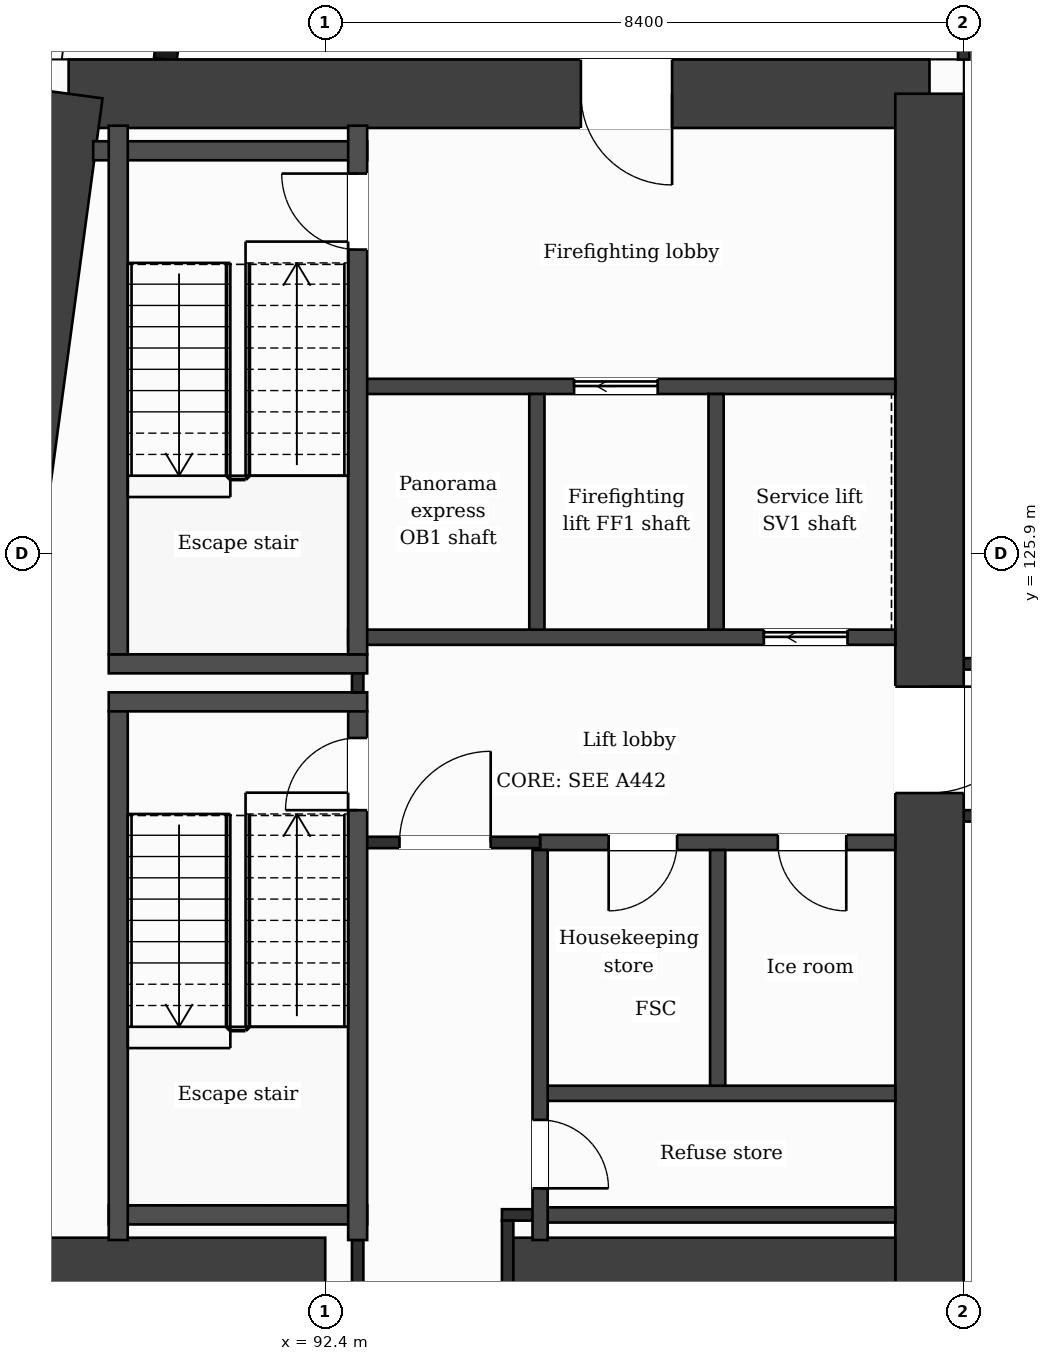
"""IFC4 building model, lengths in metres.
Left out: names, types, materials, properties, quantities, classifications, styles, units other than length and angle.
Written with IfcOpenShell. Run it as: python <this file> out.ifc"""

import sys

from ifc_helpers import new_model, si_unit, direction, frame, frame_2d, origin, place, context, subcontext, project, spatial, rectangle, extrude, element, fill, save


model = new_model("IFC4")
c1 = context("Model", 3, precision=1e-05, world=origin(), true_north=direction((0.0, 1.0)))
c2 = subcontext(c1, "Body", "Model", "MODEL_VIEW")
j1 = project(units=[si_unit("LENGTHUNIT", "METRE"), si_unit("PLANEANGLEUNIT", "RADIAN")], contexts=[c1])
p1 = place(None, origin())
s1 = spatial("IfcSite", under=j1, at=p1, CompositionType="ELEMENT")
p2 = place(p1, origin())
s2 = spatial("IfcBuilding", under=s1, at=p2, CompositionType="ELEMENT")
p3 = place(p2, frame((0.0, 0.0, 173.7)))
s3 = spatial("IfcBuildingStorey", under=s2, at=p3, CompositionType="ELEMENT", Elevation=173.7)
p4 = place(p3, frame((89.024, 131.95, 0.0), z_axis=(0.0, 0.0, 1.0), x_axis=(1.0, 0.0, 0.0)))
e1 = element("IfcWall", 1, at=p4, inside=s3, PredefinedType="SHEAR", context=c2, shape_type="SweptSolid", body=[
    extrude(rectangle(XDim=11.326, YDim=0.9, at=frame_2d((5.663, 0.0))), origin(), (0.0, 0.0, 1.0), 3.7),
])
p5 = place(p4, frame((6.739, 0.0, 0.0)))
e2 = element("IfcOpeningElement", 2, at=p5, cuts=e1, PredefinedType="OPENING", context=c2, shape_type="SweptSolid", body=[
    extrude(rectangle(XDim=1.2, YDim=2.1, at=frame_2d((0.6, 1.05))), frame((0.0, 0.46, 0.0), z_axis=(0.0, -1.0, 0.0), x_axis=(1.0, 0.0, 0.0)), (0.0, 0.0, 1.0), 0.92),
])
p6 = place(p3, frame((100.35, 131.95, 0.0), z_axis=(0.0, 0.0, 1.0), x_axis=(0.0, -1.0, 0.0)))
e3 = element("IfcWall", 3, at=p6, inside=s3, PredefinedType="SHEAR", context=c2, shape_type="SweptSolid", body=[
    extrude(rectangle(XDim=21.1, YDim=0.9, at=frame_2d((10.55, 0.0))), origin(), (0.0, 0.0, 1.0), 3.7),
])
p7 = place(p6, frame((7.8, 0.0, 0.0)))
e4 = element("IfcOpeningElement", 4, at=p7, cuts=e3, PredefinedType="OPENING", context=c2, shape_type="SweptSolid", body=[
    extrude(rectangle(XDim=1.4, YDim=2.1, at=frame_2d((0.7, 1.05))), frame((0.0, 0.46, 0.0), z_axis=(0.0, -1.0, 0.0), x_axis=(1.0, 0.0, 0.0)), (0.0, 0.0, 1.0), 0.92),
])
p8 = place(p3, frame((86.184, 110.85, 0.0), z_axis=(0.0, 0.0, 1.0), x_axis=(0.133410495943, 0.991060865725, 0.0)))
e5 = element("IfcWall", 5, at=p8, inside=s3, PredefinedType="SHEAR", context=c2, shape_type="SweptSolid", body=[
    extrude(rectangle(XDim=21.29, YDim=0.9, at=frame_2d((10.645, 0.0))), origin(), (0.0, 0.0, 1.0), 3.7),
])
p9 = place(p3, frame((87.323, 116.45, 0.0), z_axis=(0.0, 0.0, 1.0), x_axis=(1.0, 0.0, 0.0)))
e6 = element("IfcWall", 6, at=p9, inside=s3, PredefinedType="SHEAR", context=c2, shape_type="SweptSolid", body=[
    extrude(rectangle(XDim=5.077, YDim=0.9, at=frame_2d((2.539, 0.0))), origin(), (0.0, 0.0, 1.0), 3.7),
])
p10 = place(p3, frame((94.8, 116.45, 0.0), z_axis=(0.0, 0.0, 1.0), x_axis=(1.0, 0.0, 0.0)))
e7 = element("IfcWall", 7, at=p10, inside=s3, PredefinedType="SHEAR", context=c2, shape_type="SweptSolid", body=[
    extrude(rectangle(XDim=5.1, YDim=0.9, at=frame_2d((2.55, 0.0))), origin(), (0.0, 0.0, 1.0), 3.7),
])
p11 = place(p3, frame((91.177, 138.95, 0.0), z_axis=(0.0, 0.0, 1.0), x_axis=(-0.133426664613, -0.991058689065, 0.0)))
e8 = element("IfcWall", 8, at=p11, inside=s3, PredefinedType="SOLIDWALL", context=c2, shape_type="SweptSolid", body=[
    extrude(rectangle(XDim=6.609, YDim=0.3, at=frame_2d((3.305, 0.0))), origin(), (0.0, 0.0, 1.0), 3.38),
])
p12 = place(p11, frame((1.039, 0.0, 0.9)))
e9 = element("IfcOpeningElement", 9, at=p12, cuts=e8, PredefinedType="OPENING", context=c2, shape_type="SweptSolid", body=[
    extrude(rectangle(XDim=1.2, YDim=2.1, at=frame_2d((0.6, 1.05))), frame((0.0, 0.16, 0.0), z_axis=(0.0, -1.0, 0.0), x_axis=(1.0, 0.0, 0.0)), (0.0, 0.0, 1.0), 0.32),
])
p13 = place(p11, frame((4.294, 0.0, 0.0)))
e10 = element("IfcOpeningElement", 10, at=p13, cuts=e8, PredefinedType="OPENING", context=c2, shape_type="SweptSolid", body=[
    extrude(rectangle(XDim=1.2, YDim=2.4, at=frame_2d((0.6, 1.2))), frame((0.0, 0.16, 0.0), z_axis=(0.0, -1.0, 0.0), x_axis=(1.0, 0.0, 0.0)), (0.0, 0.0, 1.0), 0.32),
])
p14 = place(p3, frame((95.227, 117.2, 0.0), z_axis=(0.0, 0.0, 1.0), x_axis=(1.0, 0.0, 0.0)))
e11 = element("IfcWall", 11, at=p14, inside=s3, PredefinedType="PARTITIONING", context=c2, shape_type="SweptSolid", body=[
    extrude(rectangle(XDim=4.673, YDim=0.2, at=frame_2d((2.336, 0.0))), origin(), (0.0, 0.0, 1.0), 3.38),
])
p15 = place(p3, frame((94.725, 117.2, 0.0), z_axis=(0.0, 0.0, 1.0), x_axis=(1.0, 0.0, 0.0)))
e12 = element("IfcWall", 12, at=p15, inside=s3, PredefinedType="PARTITIONING", context=c2, shape_type="SweptSolid", body=[
    extrude(rectangle(XDim=0.502, YDim=0.15, at=frame_2d((0.251, 0.0))), origin(), (0.0, 0.0, 1.0), 3.38),
])
p16 = place(p3, frame((89.552, 117.2, 0.0), z_axis=(0.0, 0.0, 1.0), x_axis=(1.0, 0.0, 0.0)))
e13 = element("IfcWall", 13, at=p16, inside=s3, PredefinedType="PARTITIONING", context=c2, shape_type="SweptSolid", body=[
    extrude(rectangle(XDim=3.4, YDim=0.25, at=frame_2d((1.7, 0.0))), origin(), (0.0, 0.0, 1.0), 3.38),
])
p17 = place(p3, frame((95.227, 118.8, 0.0), z_axis=(0.0, 0.0, 1.0), x_axis=(1.0, 0.0, 0.0)))
e14 = element("IfcWall", 14, at=p17, inside=s3, PredefinedType="PARTITIONING", context=c2, shape_type="SweptSolid", body=[
    extrude(rectangle(XDim=4.673, YDim=0.2, at=frame_2d((2.336, 0.0))), origin(), (0.0, 0.0, 1.0), 3.38),
])
p18 = place(p3, frame((95.227, 122.1, 0.0), z_axis=(0.0, 0.0, 1.0), x_axis=(1.0, 0.0, 0.0)))
e15 = element("IfcWall", 15, at=p18, inside=s3, PredefinedType="PARTITIONING", context=c2, shape_type="SweptSolid", body=[
    extrude(rectangle(XDim=4.673, YDim=0.2, at=frame_2d((2.336, 0.0))), origin(), (0.0, 0.0, 1.0), 3.38),
])
p19 = place(p18, frame((0.902, 0.0, 0.0)))
e16 = element("IfcOpeningElement", 16, at=p19, cuts=e15, PredefinedType="OPENING", context=c2, shape_type="SweptSolid", body=[
    extrude(rectangle(XDim=0.9, YDim=2.1, at=frame_2d((0.45, 1.05))), frame((0.0, 0.11, 0.0), z_axis=(0.0, -1.0, 0.0), x_axis=(1.0, 0.0, 0.0)), (0.0, 0.0, 1.0), 0.22),
])
p20 = place(p18, frame((3.128, 0.0, 0.0)))
e17 = element("IfcOpeningElement", 17, at=p20, cuts=e15, PredefinedType="OPENING", context=c2, shape_type="SweptSolid", body=[
    extrude(rectangle(XDim=0.9, YDim=2.1, at=frame_2d((0.45, 1.05))), frame((0.0, 0.11, 0.0), z_axis=(0.0, -1.0, 0.0), x_axis=(1.0, 0.0, 0.0)), (0.0, 0.0, 1.0), 0.22),
])
p21 = place(p3, frame((92.827, 122.1, 0.0), z_axis=(0.0, 0.0, 1.0), x_axis=(1.0, 0.0, 0.0)))
e18 = element("IfcWall", 18, at=p21, inside=s3, PredefinedType="PARTITIONING", context=c2, shape_type="SweptSolid", body=[
    extrude(rectangle(XDim=2.4, YDim=0.15, at=frame_2d((1.2, 0.0))), origin(), (0.0, 0.0, 1.0), 3.38),
])
p22 = place(p21, frame((0.55, 0.0, 0.0)))
e19 = element("IfcOpeningElement", 19, at=p22, cuts=e18, PredefinedType="OPENING", context=c2, shape_type="SweptSolid", body=[
    extrude(rectangle(XDim=1.2, YDim=2.1, at=frame_2d((0.6, 1.05))), frame((0.0, 0.085, 0.0), z_axis=(0.0, -1.0, 0.0), x_axis=(1.0, 0.0, 0.0)), (0.0, 0.0, 1.0), 0.17),
])
p23 = place(p3, frame((100.8, 122.45, 0.0), z_axis=(0.0, 0.0, 1.0), x_axis=(1.0, 0.0, 0.0)))
e20 = element("IfcWall", 20, at=p23, inside=s3, PredefinedType="PARTITIONING", context=c2, shape_type="SweptSolid", body=[
    extrude(rectangle(XDim=25.2, YDim=0.15, at=frame_2d((12.6, 0.0))), origin(), (0.0, 0.0, 1.0), 3.38),
])
for number, where, z_axis, x_axis in (
    (21, (89.552, 123.95, 0.0), (0.0, 0.0, 1.0), (1.0, 0.0, 0.0)),
    (22, (89.552, 124.45, 0.0), (0.0, 0.0, 1.0), (1.0, 0.0, 0.0)),
):
    element("IfcWall", number, at=place(p3, frame(where, z_axis=z_axis, x_axis=x_axis)), inside=s3, PredefinedType="PARTITIONING", context=c2, shape_type="SweptSolid", body=[
        extrude(rectangle(XDim=3.4, YDim=0.25, at=frame_2d((1.7, 0.0))), origin(), (0.0, 0.0, 1.0), 3.38),
    ])
p24 = place(p3, frame((100.8, 124.45, 0.0), z_axis=(0.0, 0.0, 1.0), x_axis=(1.0, 0.0, 0.0)))
e23 = element("IfcWall", 23, at=p24, inside=s3, PredefinedType="PARTITIONING", context=c2, shape_type="SweptSolid", body=[
    extrude(rectangle(XDim=25.2, YDim=0.15, at=frame_2d((12.6, 0.0))), origin(), (0.0, 0.0, 1.0), 3.38),
])
p25 = place(p24, frame((0.975, 0.0, 0.0)))
e24 = element("IfcOpeningElement", 24, at=p25, cuts=e23, PredefinedType="OPENING", context=c2, shape_type="SweptSolid", body=[
    extrude(rectangle(XDim=1.0, YDim=2.1, at=frame_2d((0.5, 1.05))), frame((0.0, 0.085, 0.0), z_axis=(0.0, -1.0, 0.0), x_axis=(1.0, 0.0, 0.0)), (0.0, 0.0, 1.0), 0.17),
])
p26 = place(p24, frame((6.05, 0.0, 0.0)))
e25 = element("IfcOpeningElement", 25, at=p26, cuts=e23, PredefinedType="OPENING", context=c2, shape_type="SweptSolid", body=[
    extrude(rectangle(XDim=1.0, YDim=2.1, at=frame_2d((0.5, 1.05))), frame((0.0, 0.085, 0.0), z_axis=(0.0, -1.0, 0.0), x_axis=(1.0, 0.0, 0.0)), (0.0, 0.0, 1.0), 0.17),
])
p27 = place(p24, frame((9.27, 0.0, 0.0)))
e26 = element("IfcOpeningElement", 26, at=p27, cuts=e23, PredefinedType="OPENING", context=c2, shape_type="SweptSolid", body=[
    extrude(rectangle(XDim=1.0, YDim=2.1, at=frame_2d((0.5, 1.05))), frame((0.0, 0.085, 0.0), z_axis=(0.0, -1.0, 0.0), x_axis=(1.0, 0.0, 0.0)), (0.0, 0.0, 1.0), 0.17),
])
p28 = place(p24, frame((14.2, 0.0, 0.0)))
e27 = element("IfcOpeningElement", 27, at=p28, cuts=e23, PredefinedType="OPENING", context=c2, shape_type="SweptSolid", body=[
    extrude(rectangle(XDim=1.0, YDim=2.1, at=frame_2d((0.5, 1.05))), frame((0.0, 0.085, 0.0), z_axis=(0.0, -1.0, 0.0), x_axis=(1.0, 0.0, 0.0)), (0.0, 0.0, 1.0), 0.17),
])
p29 = place(p24, frame((18.825, 0.0, 0.0)))
e28 = element("IfcOpeningElement", 28, at=p29, cuts=e23, PredefinedType="OPENING", context=c2, shape_type="SweptSolid", body=[
    extrude(rectangle(XDim=1.0, YDim=2.1, at=frame_2d((0.5, 1.05))), frame((0.0, 0.085, 0.0), z_axis=(0.0, -1.0, 0.0), x_axis=(1.0, 0.0, 0.0)), (0.0, 0.0, 1.0), 0.17),
])
p30 = place(p3, frame((92.702, 124.8, 0.0), z_axis=(0.0, 0.0, 1.0), x_axis=(1.0, 0.0, 0.0)))
e29 = element("IfcWall", 29, at=p30, inside=s3, PredefinedType="PARTITIONING", context=c2, shape_type="SweptSolid", body=[
    extrude(rectangle(XDim=7.198, YDim=0.2, at=frame_2d((3.599, 0.0))), origin(), (0.0, 0.0, 1.0), 3.38),
])
p31 = place(p30, frame((5.469, 0.0, 0.0)))
e30 = element("IfcOpeningElement", 30, at=p31, cuts=e29, PredefinedType="OPENING", context=c2, shape_type="SweptSolid", body=[
    extrude(rectangle(XDim=1.1, YDim=2.1, at=frame_2d((0.55, 1.05))), frame((0.0, 0.11, 0.0), z_axis=(0.0, -1.0, 0.0), x_axis=(1.0, 0.0, 0.0)), (0.0, 0.0, 1.0), 0.22),
])
p32 = place(p3, frame((92.827, 128.1, 0.0), z_axis=(0.0, 0.0, 1.0), x_axis=(1.0, 0.0, 0.0)))
e31 = element("IfcWall", 31, at=p32, inside=s3, PredefinedType="PARTITIONING", context=c2, shape_type="SweptSolid", body=[
    extrude(rectangle(XDim=7.073, YDim=0.2, at=frame_2d((3.537, 0.0))), origin(), (0.0, 0.0, 1.0), 3.38),
])
p33 = place(p32, frame((2.847, 0.0, 0.0)))
e32 = element("IfcOpeningElement", 32, at=p33, cuts=e31, PredefinedType="OPENING", context=c2, shape_type="SweptSolid", body=[
    extrude(rectangle(XDim=1.1, YDim=2.1, at=frame_2d((0.55, 1.05))), frame((0.0, 0.11, 0.0), z_axis=(0.0, -1.0, 0.0), x_axis=(1.0, 0.0, 0.0)), (0.0, 0.0, 1.0), 0.22),
])
p34 = place(p3, frame((89.347, 131.2, 0.0), z_axis=(0.0, 0.0, 1.0), x_axis=(1.0, 0.0, 0.0)))
e33 = element("IfcWall", 33, at=p34, inside=s3, PredefinedType="PARTITIONING", context=c2, shape_type="SweptSolid", body=[
    extrude(rectangle(XDim=3.604, YDim=0.25, at=frame_2d((1.802, 0.0))), origin(), (0.0, 0.0, 1.0), 3.38),
])
p35 = place(p3, frame((89.677, 116.87, 0.0), z_axis=(0.0, 0.0, 1.0), x_axis=(0.0, 1.0, 0.0)))
e34 = element("IfcWall", 34, at=p35, inside=s3, PredefinedType="PARTITIONING", context=c2, shape_type="SweptSolid", body=[
    extrude(rectangle(XDim=6.955, YDim=0.25, at=frame_2d((3.478, 0.0))), origin(), (0.0, 0.0, 1.0), 3.38),
])
p36 = place(p3, frame((89.677, 124.575, 0.0), z_axis=(0.0, 0.0, 1.0), x_axis=(0.0, 1.0, 0.0)))
e35 = element("IfcWall", 35, at=p36, inside=s3, PredefinedType="PARTITIONING", context=c2, shape_type="SweptSolid", body=[
    extrude(rectangle(XDim=6.955, YDim=0.25, at=frame_2d((3.478, 0.0))), origin(), (0.0, 0.0, 1.0), 3.38),
])
p37 = place(p3, frame((92.827, 116.0, 0.0), z_axis=(0.0, 0.0, 1.0), x_axis=(0.0, 1.0, 0.0)))
e36 = element("IfcWall", 36, at=p37, inside=s3, PredefinedType="PARTITIONING", context=c2, shape_type="SweptSolid", body=[
    extrude(rectangle(XDim=0.87, YDim=0.15, at=frame_2d((0.435, 0.0))), origin(), (0.0, 0.0, 1.0), 3.38),
])
p38 = place(p3, frame((92.827, 124.075, 0.0), z_axis=(0.0, 0.0, 1.0), x_axis=(0.0, 1.0, 0.0)))
e37 = element("IfcWall", 37, at=p38, inside=s3, PredefinedType="PARTITIONING", context=c2, shape_type="SweptSolid", body=[
    extrude(rectangle(XDim=0.25, YDim=0.15, at=frame_2d((0.125, 0.0))), origin(), (0.0, 0.0, 1.0), 3.38),
])
p39 = place(p3, frame((92.827, 116.87, 0.0), z_axis=(0.0, 0.0, 1.0), x_axis=(0.0, 1.0, 0.0)))
e38 = element("IfcWall", 38, at=p39, inside=s3, PredefinedType="PARTITIONING", context=c2, shape_type="SweptSolid", body=[
    extrude(rectangle(XDim=6.955, YDim=0.25, at=frame_2d((3.478, 0.0))), origin(), (0.0, 0.0, 1.0), 3.38),
])
p40 = place(p39, frame((5.655, 0.0, 0.0)))
e39 = element("IfcOpeningElement", 39, at=p40, cuts=e38, PredefinedType="OPENING", context=c2, shape_type="SweptSolid", body=[
    extrude(rectangle(XDim=0.95, YDim=2.1, at=frame_2d((0.475, 1.05))), frame((0.0, 0.135, 0.0), z_axis=(0.0, -1.0, 0.0), x_axis=(1.0, 0.0, 0.0)), (0.0, 0.0, 1.0), 0.27),
])
p41 = place(p3, frame((92.827, 124.575, 0.0), z_axis=(0.0, 0.0, 1.0), x_axis=(0.0, 1.0, 0.0)))
e40 = element("IfcWall", 40, at=p41, inside=s3, PredefinedType="PARTITIONING", context=c2, shape_type="SweptSolid", body=[
    extrude(rectangle(XDim=6.955, YDim=0.25, at=frame_2d((3.478, 0.0))), origin(), (0.0, 0.0, 1.0), 3.38),
])
p42 = place(p41, frame((5.325, 0.0, 0.0)))
e41 = element("IfcOpeningElement", 41, at=p42, cuts=e40, PredefinedType="OPENING", context=c2, shape_type="SweptSolid", body=[
    extrude(rectangle(XDim=1.0, YDim=2.1, at=frame_2d((0.5, 1.05))), frame((0.0, 0.135, 0.0), z_axis=(0.0, -1.0, 0.0), x_axis=(1.0, 0.0, 0.0)), (0.0, 0.0, 1.0), 0.27),
])
p43 = place(p3, frame((94.8, 116.0, 0.0), z_axis=(0.0, 0.0, 1.0), x_axis=(0.0, 1.0, 0.0)))
e42 = element("IfcWall", 42, at=p43, inside=s3, PredefinedType="PARTITIONING", context=c2, shape_type="SweptSolid", body=[
    extrude(rectangle(XDim=1.125, YDim=0.15, at=frame_2d((0.562, 0.0))), origin(), (0.0, 0.0, 1.0), 3.38),
])
p44 = place(p3, frame((95.185, 124.9, 0.0), z_axis=(0.0, 0.0, 1.0), x_axis=(0.0, 1.0, 0.0)))
e43 = element("IfcWall", 43, at=p44, inside=s3, PredefinedType="PARTITIONING", context=c2, shape_type="SweptSolid", body=[
    extrude(rectangle(XDim=3.1, YDim=0.2, at=frame_2d((1.55, 0.0))), origin(), (0.0, 0.0, 1.0), 3.38),
])
p45 = place(p3, frame((95.227, 116.87, 0.0), z_axis=(0.0, 0.0, 1.0), x_axis=(0.0, 1.0, 0.0)))
e44 = element("IfcWall", 44, at=p45, inside=s3, PredefinedType="PARTITIONING", context=c2, shape_type="SweptSolid", body=[
    extrude(rectangle(XDim=5.13, YDim=0.2, at=frame_2d((2.565, 0.0))), origin(), (0.0, 0.0, 1.0), 3.38),
])
p46 = place(p45, frame((0.68, 0.0, 0.0)))
e45 = element("IfcOpeningElement", 45, at=p46, cuts=e44, PredefinedType="OPENING", context=c2, shape_type="SweptSolid", body=[
    extrude(rectangle(XDim=0.9, YDim=2.1, at=frame_2d((0.45, 1.05))), frame((0.0, 0.11, 0.0), z_axis=(0.0, -1.0, 0.0), x_axis=(1.0, 0.0, 0.0)), (0.0, 0.0, 1.0), 0.22),
])
for number, where, z_axis, x_axis in (
    (46, (97.542, 124.9, 0.0), (0.0, 0.0, 1.0), (0.0, 1.0, 0.0)),
    (47, (97.563, 118.9, 0.0), (0.0, 0.0, 1.0), (0.0, 1.0, 0.0)),
):
    element("IfcWall", number, at=place(p3, frame(where, z_axis=z_axis, x_axis=x_axis)), inside=s3, PredefinedType="PARTITIONING", context=c2, shape_type="SweptSolid", body=[
        extrude(rectangle(XDim=3.1, YDim=0.2, at=frame_2d((1.55, 0.0))), origin(), (0.0, 0.0, 1.0), 3.38),
    ])
p47 = place(p3, frame((100.8, 132.4, 0.0), z_axis=(0.0, 0.0, 1.0), x_axis=(0.0, 1.0, 0.0)))
e48 = element("IfcWall", 48, at=p47, inside=s3, PredefinedType="PARTITIONING", context=c2, shape_type="SweptSolid", body=[
    extrude(rectangle(XDim=1.325, YDim=0.15, at=frame_2d((0.663, 0.0))), origin(), (0.0, 0.0, 1.0), 3.38),
])
p48 = place(p22, origin())
e49 = element("IfcDoor", 49, at=p48, inside=s3, OperationType="SINGLE_SWING_RIGHT", PredefinedType="DOOR", context=c2, shape_type="SweptSolid", body=[
    extrude(rectangle(XDim=1.2, YDim=2.1, at=frame_2d((0.6, 1.05))), frame((0.0, 0.025, 0.0), z_axis=(0.0, -1.0, 0.0), x_axis=(1.0, 0.0, 0.0)), (0.0, 0.0, 1.0), 0.05),
])
fill(e19, e49)
p49 = place(p33, origin())
e50 = element("IfcDoor", 50, at=p49, inside=s3, OperationType="SLIDING_TO_LEFT", PredefinedType="DOOR", context=c2, shape_type="SweptSolid", body=[
    extrude(rectangle(XDim=1.1, YDim=2.1, at=frame_2d((0.55, 1.05))), frame((0.0, 0.025, 0.0), z_axis=(0.0, -1.0, 0.0), x_axis=(1.0, 0.0, 0.0)), (0.0, 0.0, 1.0), 0.05),
])
fill(e32, e50)
p50 = place(p31, origin())
e51 = element("IfcDoor", 51, at=p50, inside=s3, OperationType="SLIDING_TO_LEFT", PredefinedType="DOOR", context=c2, shape_type="SweptSolid", body=[
    extrude(rectangle(XDim=1.1, YDim=2.1, at=frame_2d((0.55, 1.05))), frame((0.0, 0.025, 0.0), z_axis=(0.0, -1.0, 0.0), x_axis=(1.0, 0.0, 0.0)), (0.0, 0.0, 1.0), 0.05),
])
fill(e30, e51)
p51 = place(p19, origin())
e52 = element("IfcDoor", 52, at=p51, inside=s3, OperationType="SINGLE_SWING_LEFT", PredefinedType="DOOR", context=c2, shape_type="SweptSolid", body=[
    extrude(rectangle(XDim=0.9, YDim=2.1, at=frame_2d((0.45, 1.05))), frame((0.0, 0.025, 0.0), z_axis=(0.0, -1.0, 0.0), x_axis=(1.0, 0.0, 0.0)), (0.0, 0.0, 1.0), 0.05),
])
fill(e16, e52)
p52 = place(p20, origin())
e53 = element("IfcDoor", 53, at=p52, inside=s3, OperationType="SINGLE_SWING_RIGHT", PredefinedType="DOOR", context=c2, shape_type="SweptSolid", body=[
    extrude(rectangle(XDim=0.9, YDim=2.1, at=frame_2d((0.45, 1.05))), frame((0.0, 0.025, 0.0), z_axis=(0.0, -1.0, 0.0), x_axis=(1.0, 0.0, 0.0)), (0.0, 0.0, 1.0), 0.05),
])
fill(e17, e53)
p53 = place(p40, origin())
e54 = element("IfcDoor", 54, at=p53, inside=s3, OperationType="SINGLE_SWING_LEFT", PredefinedType="DOOR", context=c2, shape_type="SweptSolid", body=[
    extrude(rectangle(XDim=0.95, YDim=2.1, at=frame_2d((0.475, 1.05))), frame((0.0, 0.025, 0.0), z_axis=(0.0, -1.0, 0.0), x_axis=(1.0, 0.0, 0.0)), (0.0, 0.0, 1.0), 0.05),
])
fill(e39, e54)
p54 = place(p42, origin())
e55 = element("IfcDoor", 55, at=p54, inside=s3, OperationType="SINGLE_SWING_RIGHT", PredefinedType="DOOR", context=c2, shape_type="SweptSolid", body=[
    extrude(rectangle(XDim=1.0, YDim=2.1, at=frame_2d((0.5, 1.05))), frame((0.0, 0.025, 0.0), z_axis=(0.0, -1.0, 0.0), x_axis=(1.0, 0.0, 0.0)), (0.0, 0.0, 1.0), 0.05),
])
fill(e41, e55)
p55 = place(p46, origin())
e56 = element("IfcDoor", 56, at=p55, inside=s3, OperationType="SINGLE_SWING_LEFT", PredefinedType="DOOR", context=c2, shape_type="SweptSolid", body=[
    extrude(rectangle(XDim=0.9, YDim=2.1, at=frame_2d((0.45, 1.05))), frame((0.0, 0.025, 0.0), z_axis=(0.0, -1.0, 0.0), x_axis=(1.0, 0.0, 0.0)), (0.0, 0.0, 1.0), 0.05),
])
fill(e45, e56)
p56 = place(p5, origin())
e57 = element("IfcDoor", 57, at=p56, inside=s3, OperationType="SINGLE_SWING_RIGHT", PredefinedType="DOOR", context=c2, shape_type="SweptSolid", body=[
    extrude(rectangle(XDim=1.2, YDim=2.1, at=frame_2d((0.6, 1.05))), frame((0.0, 0.025, 0.0), z_axis=(0.0, -1.0, 0.0), x_axis=(1.0, 0.0, 0.0)), (0.0, 0.0, 1.0), 0.05),
])
fill(e2, e57)
p57 = place(p7, origin())
e58 = element("IfcDoor", 58, at=p57, inside=s3, OperationType="SINGLE_SWING_LEFT", PredefinedType="DOOR", context=c2, shape_type="SweptSolid", body=[
    extrude(rectangle(XDim=1.4, YDim=2.1, at=frame_2d((0.7, 1.05))), frame((0.0, 0.025, 0.0), z_axis=(0.0, -1.0, 0.0), x_axis=(1.0, 0.0, 0.0)), (0.0, 0.0, 1.0), 0.05),
])
fill(e4, e58)
save(model, sys.argv[1])
